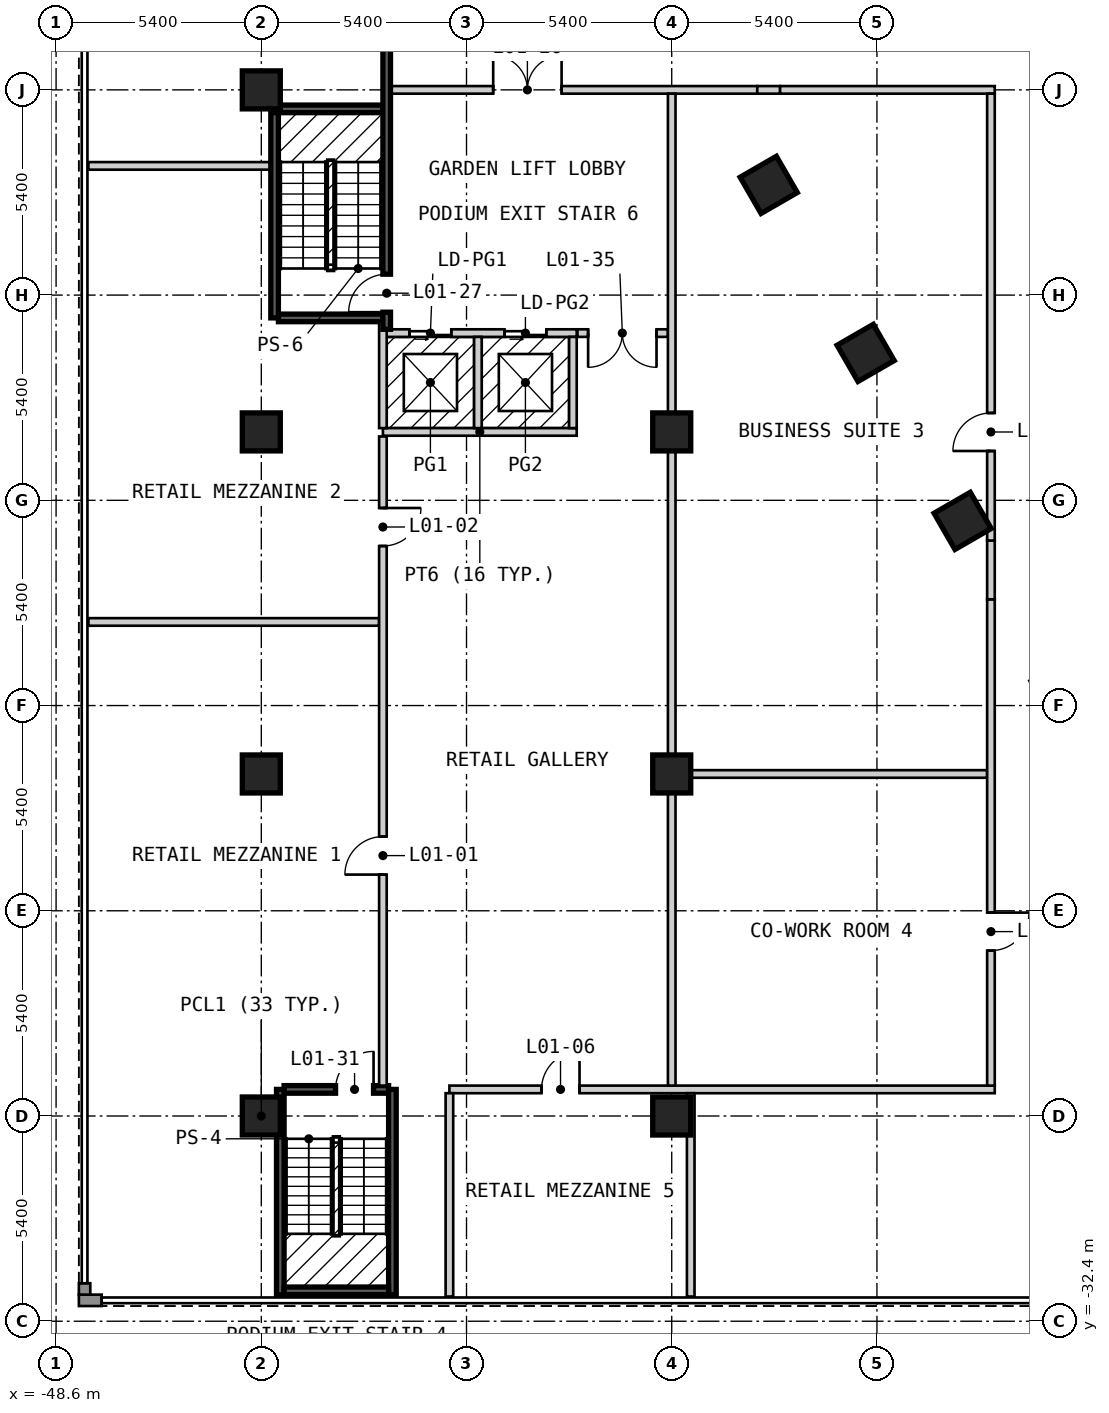
"""IFC4 building model, lengths in metres.
Left out: names, types, materials, properties, quantities, classifications, styles, units other than length and angle.
Written with IfcOpenShell. Run it as: python <this file> out.ifc"""

import sys

from ifc_helpers import new_model, si_unit, direction, frame, frame_2d, origin, origin_2d, place, context, subcontext, project, spatial, rectangle, extrude, element, fill, save


model = new_model("IFC4")
c1 = context("Model", 3, precision=1e-05, world=origin(), true_north=direction((0.0, 1.0)))
c2 = subcontext(c1, "Body", "Model", "MODEL_VIEW")
j1 = project(units=[si_unit("LENGTHUNIT", "METRE"), si_unit("PLANEANGLEUNIT", "RADIAN")], contexts=[c1])
p1 = place(None, origin())
s1 = spatial("IfcSite", under=j1, at=p1, CompositionType="ELEMENT")
p2 = place(p1, origin())
s2 = spatial("IfcBuilding", under=s1, at=p2, CompositionType="ELEMENT")
p3 = place(p2, frame((0.0, 0.0, 5.0)))
s3 = spatial("IfcBuildingStorey", under=s2, at=p3, CompositionType="ELEMENT", Elevation=5.0)
for number, where, z_axis, x_axis in (
    (1, (-29.848, -2.5, 0.0), (0.0, 0.0, 1.0), (0.5, -0.866, 0.0)),
    (2, (-27.297, -6.921, 0.0), (0.0, 0.0, 1.0), (0.5, -0.866, 0.0)),
    (3, (-24.745, -11.341, 0.0), (0.0, 0.0, 1.0), (0.5, -0.866, 0.0)),
):
    element("IfcColumn", number, at=place(p3, frame(where, z_axis=z_axis, x_axis=x_axis)), inside=s3, PredefinedType="COLUMN", context=c2, shape_type="SweptSolid", body=[
        extrude(rectangle(XDim=1.1, YDim=1.1, at=origin_2d()), origin(), (0.0, 0.0, 1.0), 4.0),
    ])
for number, where, z_axis, x_axis in (
    (4, (-43.2, -27.0, 0.0), (0.0, 0.0, 1.0), (1.0, 0.0, 0.0)),
    (5, (-43.2, -18.0, 0.0), (0.0, 0.0, 1.0), (1.0, 0.0, 0.0)),
    (6, (-43.2, -9.0, 0.0), (0.0, 0.0, 1.0), (1.0, 0.0, 0.0)),
    (7, (-43.2, 0.0, 0.0), (0.0, 0.0, 1.0), (1.0, 0.0, 0.0)),
    (8, (-32.4, -27.0, 0.0), (0.0, 0.0, 1.0), (1.0, 0.0, 0.0)),
    (9, (-32.4, -18.0, 0.0), (0.0, 0.0, 1.0), (1.0, 0.0, 0.0)),
    (10, (-32.4, -9.0, 0.0), (0.0, 0.0, 1.0), (1.0, 0.0, 0.0)),
):
    element("IfcColumn", number, at=place(p3, frame(where, z_axis=z_axis, x_axis=x_axis)), inside=s3, PredefinedType="COLUMN", context=c2, shape_type="SweptSolid", body=[
        extrude(rectangle(XDim=1.0, YDim=1.0, at=origin_2d()), origin(), (0.0, 0.0, 1.0), 4.0),
    ])
p4 = place(p3, frame((-48.0, -31.85, 0.0), z_axis=(0.0, 0.0, 1.0), x_axis=(1.0, 0.0, 0.0)))
e11 = element("IfcWall", 11, at=p4, inside=s3, PredefinedType="SOLIDWALL", context=c2, shape_type="SweptSolid", body=[
    extrude(rectangle(XDim=0.6, YDim=0.3, at=frame_2d((0.3, 0.0))), origin(), (0.0, 0.0, 1.0), 3.5),
])
p5 = place(p3, frame((-47.85, -31.4, 0.0), z_axis=(0.0, 0.0, 1.0), x_axis=(0.0, -1.0, 0.0)))
e12 = element("IfcWall", 12, at=p5, inside=s3, PredefinedType="SOLIDWALL", context=c2, shape_type="SweptSolid", body=[
    extrude(rectangle(XDim=0.3, YDim=0.3, at=frame_2d((0.15, 0.0))), origin(), (0.0, 0.0, 1.0), 3.5),
])
p6 = place(p3, frame((-42.6, -26.3, 0.0), z_axis=(0.0, 0.0, 1.0), x_axis=(1.0, 0.0, 0.0)))
e13 = element("IfcWall", 13, at=p6, inside=s3, PredefinedType="SOLIDWALL", context=c2, shape_type="SweptSolid", body=[
    extrude(rectangle(XDim=2.75, YDim=0.2, at=frame_2d((1.375, 0.0))), origin(), (0.0, 0.0, 1.0), 3.5),
])
p7 = place(p6, frame((2.354, 0.0, 0.0), z_axis=(0.0, 0.0, 1.0), x_axis=(-1.0, 0.0, 0.0)))
e14 = element("IfcOpeningElement", 14, at=p7, cuts=e13, PredefinedType="OPENING", context=c2, shape_type="SweptSolid", body=[
    extrude(rectangle(XDim=1.0, YDim=2.1, at=frame_2d((0.5, 1.05))), frame((0.0, 0.11, 0.0), z_axis=(0.0, -1.0, 0.0), x_axis=(1.0, 0.0, 0.0)), (0.0, 0.0, 1.0), 0.22),
])
p8 = place(p3, frame((-38.25, -26.3, 0.0), z_axis=(0.0, 0.0, 1.0), x_axis=(1.0, 0.0, 0.0)))
e15 = element("IfcWall", 15, at=p8, inside=s3, PredefinedType="PARTITIONING", context=c2, shape_type="SweptSolid", body=[
    extrude(rectangle(XDim=14.35, YDim=0.2, at=frame_2d((7.175, 0.0))), origin(), (0.0, 0.0, 1.0), 3.5),
])
p9 = place(p8, frame((3.424, 0.0, 0.0), z_axis=(0.0, 0.0, 1.0), x_axis=(-1.0, 0.0, 0.0)))
e16 = element("IfcOpeningElement", 16, at=p9, cuts=e15, PredefinedType="OPENING", context=c2, shape_type="SweptSolid", body=[
    extrude(rectangle(XDim=1.0, YDim=2.1, at=frame_2d((0.5, 1.05))), frame((0.0, 0.11, 0.0), z_axis=(0.0, -1.0, 0.0), x_axis=(1.0, 0.0, 0.0)), (0.0, 0.0, 1.0), 0.22),
])
p10 = place(p3, frame((-32.3, -18.0, 0.0), z_axis=(0.0, 0.0, 1.0), x_axis=(1.0, 0.0, 0.0)))
e17 = element("IfcWall", 17, at=p10, inside=s3, PredefinedType="PARTITIONING", context=c2, shape_type="SweptSolid", body=[
    extrude(rectangle(XDim=8.2, YDim=0.2, at=frame_2d((4.1, 0.0))), origin(), (0.0, 0.0, 1.0), 3.5),
])
p11 = place(p3, frame((-47.75, -14.0, 0.0), z_axis=(0.0, 0.0, 1.0), x_axis=(1.0, 0.0, 0.0)))
e18 = element("IfcWall", 18, at=p11, inside=s3, PredefinedType="PARTITIONING", context=c2, shape_type="SweptSolid", body=[
    extrude(rectangle(XDim=7.65, YDim=0.2, at=frame_2d((3.825, 0.0))), origin(), (0.0, 0.0, 1.0), 3.5),
])
p12 = place(p3, frame((-40.0, -9.0, 0.0), z_axis=(0.0, 0.0, 1.0), x_axis=(1.0, 0.0, 0.0)))
e19 = element("IfcWall", 19, at=p12, inside=s3, PredefinedType="SOLIDWALL", context=c2, shape_type="SweptSolid", body=[
    extrude(rectangle(XDim=5.1, YDim=0.2, at=frame_2d((2.55, 0.0))), origin(), (0.0, 0.0, 1.0), 3.5),
])
p13 = place(p3, frame((-40.0, -6.4, 0.0), z_axis=(0.0, 0.0, 1.0), x_axis=(1.0, 0.0, 0.0)))
e20 = element("IfcWall", 20, at=p13, inside=s3, PredefinedType="SOLIDWALL", context=c2, shape_type="SweptSolid", body=[
    extrude(rectangle(XDim=5.1, YDim=0.2, at=frame_2d((2.55, 0.0))), origin(), (0.0, 0.0, 1.0), 3.5),
])
p14 = place(p13, frame((0.7, 0.0, 0.0)))
e21 = element("IfcOpeningElement", 21, at=p14, cuts=e20, PredefinedType="OPENING", context=c2, shape_type="SweptSolid", body=[
    extrude(rectangle(XDim=1.1, YDim=2.1, at=frame_2d((0.55, 1.05))), frame((0.0, 0.11, 0.0), z_axis=(0.0, -1.0, 0.0), x_axis=(1.0, 0.0, 0.0)), (0.0, 0.0, 1.0), 0.22),
])
p15 = place(p13, frame((3.2, 0.0, 0.0)))
e22 = element("IfcOpeningElement", 22, at=p15, cuts=e20, PredefinedType="OPENING", context=c2, shape_type="SweptSolid", body=[
    extrude(rectangle(XDim=1.1, YDim=2.1, at=frame_2d((0.55, 1.05))), frame((0.0, 0.11, 0.0), z_axis=(0.0, -1.0, 0.0), x_axis=(1.0, 0.0, 0.0)), (0.0, 0.0, 1.0), 0.22),
])
p16 = place(p3, frame((-34.88, -6.4, 0.0), z_axis=(0.0, 0.0, 1.0), x_axis=(1.0, 0.0, 0.0)))
e23 = element("IfcWall", 23, at=p16, inside=s3, PredefinedType="PARTITIONING", context=c2, shape_type="SweptSolid", body=[
    extrude(rectangle(XDim=2.38, YDim=0.2, at=frame_2d((1.19, 0.0))), origin(), (0.0, 0.0, 1.0), 3.5),
])
p17 = place(p16, frame((2.08, 0.0, 0.0), z_axis=(0.0, 0.0, 1.0), x_axis=(-1.0, 0.0, 0.0)))
e24 = element("IfcOpeningElement", 24, at=p17, cuts=e23, PredefinedType="OPENING", context=c2, shape_type="SweptSolid", body=[
    extrude(rectangle(XDim=1.8, YDim=2.1, at=frame_2d((0.9, 1.05))), frame((0.0, 0.11, 0.0), z_axis=(0.0, -1.0, 0.0), x_axis=(1.0, 0.0, 0.0)), (0.0, 0.0, 1.0), 0.22),
])
p18 = place(p3, frame((-42.75, -6.0, 0.0), z_axis=(0.0, 0.0, 1.0), x_axis=(1.0, 0.0, 0.0)))
e25 = element("IfcWall", 25, at=p18, inside=s3, PredefinedType="SOLIDWALL", context=c2, shape_type="SweptSolid", body=[
    extrude(rectangle(XDim=2.75, YDim=0.2, at=frame_2d((1.375, 0.0))), origin(), (0.0, 0.0, 1.0), 3.5),
])
p19 = place(p3, frame((-47.75, -2.0, 0.0), z_axis=(0.0, 0.0, 1.0), x_axis=(1.0, 0.0, 0.0)))
e26 = element("IfcWall", 26, at=p19, inside=s3, PredefinedType="PARTITIONING", context=c2, shape_type="SweptSolid", body=[
    extrude(rectangle(XDim=5.0, YDim=0.2, at=frame_2d((2.5, 0.0))), origin(), (0.0, 0.0, 1.0), 3.5),
])
p20 = place(p3, frame((-42.85, -0.5, 0.0), z_axis=(0.0, 0.0, 1.0), x_axis=(1.0, 0.0, 0.0)))
e27 = element("IfcWall", 27, at=p20, inside=s3, PredefinedType="SOLIDWALL", context=c2, shape_type="SweptSolid", body=[
    extrude(rectangle(XDim=2.85, YDim=0.2, at=frame_2d((1.425, 0.0))), origin(), (0.0, 0.0, 1.0), 3.5),
])
p21 = place(p3, frame((-40.0, 0.0, 0.0), z_axis=(0.0, 0.0, 1.0), x_axis=(1.0, 0.0, 0.0)))
e28 = element("IfcWall", 28, at=p21, inside=s3, PredefinedType="PARTITIONING", context=c2, shape_type="SweptSolid", body=[
    extrude(rectangle(XDim=9.851, YDim=0.2, at=frame_2d((4.926, 0.0))), origin(), (0.0, 0.0, 1.0), 3.5),
])
p22 = place(p21, frame((2.902, 0.0, 0.0)))
e29 = element("IfcOpeningElement", 29, at=p22, cuts=e28, PredefinedType="OPENING", context=c2, shape_type="SweptSolid", body=[
    extrude(rectangle(XDim=1.8, YDim=2.1, at=frame_2d((0.9, 1.05))), frame((0.0, 0.11, 0.0), z_axis=(0.0, -1.0, 0.0), x_axis=(1.0, 0.0, 0.0)), (0.0, 0.0, 1.0), 0.22),
])
p23 = place(p3, frame((-30.149, 0.0, 0.0), z_axis=(0.0, 0.0, 1.0), x_axis=(1.0, 0.0, 0.0)))
e30 = element("IfcWall", 30, at=p23, inside=s3, PredefinedType="PARTITIONING", context=c2, shape_type="SweptSolid", body=[
    extrude(rectangle(XDim=0.601, YDim=0.2, at=frame_2d((0.3, 0.0))), origin(), (0.0, 0.0, 1.0), 2.77),
])
p24 = place(p3, frame((-29.548, 0.0, 0.0), z_axis=(0.0, 0.0, 1.0), x_axis=(1.0, 0.0, 0.0)))
e31 = element("IfcWall", 31, at=p24, inside=s3, PredefinedType="PARTITIONING", context=c2, shape_type="SweptSolid", body=[
    extrude(rectangle(XDim=5.648, YDim=0.2, at=frame_2d((2.824, 0.0))), origin(), (0.0, 0.0, 1.0), 3.5),
])
for number, where, z_axis, x_axis in (
    (32, (-42.85, -6.0, 0.0), (0.0, 0.0, 1.0), (0.0, 1.0, 0.0)),
    (33, (-42.7, -31.7, 0.0), (0.0, 0.0, 1.0), (0.0, 1.0, 0.0)),
):
    element("IfcWall", number, at=place(p3, frame(where, z_axis=z_axis, x_axis=x_axis)), inside=s3, PredefinedType="SOLIDWALL", context=c2, shape_type="SweptSolid", body=[
        extrude(rectangle(XDim=5.4, YDim=0.2, at=frame_2d((2.7, 0.0))), origin(), (0.0, 0.0, 1.0), 3.5),
    ])
p25 = place(p3, frame((-40.0, -26.2, 0.0), z_axis=(0.0, 0.0, 1.0), x_axis=(0.0, 1.0, 0.0)))
e34 = element("IfcWall", 34, at=p25, inside=s3, PredefinedType="PARTITIONING", context=c2, shape_type="SweptSolid", body=[
    extrude(rectangle(XDim=17.08, YDim=0.2, at=frame_2d((8.54, 0.0))), origin(), (0.0, 0.0, 1.0), 3.5),
])
p26 = place(p25, frame((5.552, 0.0, 0.0)))
e35 = element("IfcOpeningElement", 35, at=p26, cuts=e34, PredefinedType="OPENING", context=c2, shape_type="SweptSolid", body=[
    extrude(rectangle(XDim=1.0, YDim=2.1, at=frame_2d((0.5, 1.05))), frame((0.0, 0.11, 0.0), z_axis=(0.0, -1.0, 0.0), x_axis=(1.0, 0.0, 0.0)), (0.0, 0.0, 1.0), 0.22),
])
p27 = place(p25, frame((14.198, 0.0, 0.0)))
e36 = element("IfcOpeningElement", 36, at=p27, cuts=e34, PredefinedType="OPENING", context=c2, shape_type="SweptSolid", body=[
    extrude(rectangle(XDim=1.0, YDim=2.1, at=frame_2d((0.5, 1.05))), frame((0.0, 0.11, 0.0), z_axis=(0.0, -1.0, 0.0), x_axis=(1.0, 0.0, 0.0)), (0.0, 0.0, 1.0), 0.22),
])
p28 = place(p3, frame((-40.0, -8.9, 0.0), z_axis=(0.0, 0.0, 1.0), x_axis=(0.0, 1.0, 0.0)))
e37 = element("IfcWall", 37, at=p28, inside=s3, PredefinedType="SOLIDWALL", context=c2, shape_type="SweptSolid", body=[
    extrude(rectangle(XDim=2.8, YDim=0.2, at=frame_2d((1.4, 0.0))), origin(), (0.0, 0.0, 1.0), 3.5),
])
p29 = place(p3, frame((-39.9, -6.3, 0.0), z_axis=(0.0, 0.0, 1.0), x_axis=(0.0, 1.0, 0.0)))
e38 = element("IfcWall", 38, at=p29, inside=s3, PredefinedType="SOLIDWALL", context=c2, shape_type="SweptSolid", body=[
    extrude(rectangle(XDim=33.3, YDim=0.2, at=frame_2d((16.65, 0.0))), origin(), (0.0, 0.0, 1.0), 3.5),
])
p30 = place(p29, frame((10.302, 0.0, 0.0)))
e39 = element("IfcOpeningElement", 39, at=p30, cuts=e38, PredefinedType="OPENING", context=c2, shape_type="SweptSolid", body=[
    extrude(rectangle(XDim=1.0, YDim=2.1, at=frame_2d((0.5, 1.05))), frame((0.0, 0.11, 0.0), z_axis=(0.0, -1.0, 0.0), x_axis=(1.0, 0.0, 0.0)), (0.0, 0.0, 1.0), 0.22),
])
p31 = place(p29, frame((28.298, 0.0, 0.0)))
e40 = element("IfcOpeningElement", 40, at=p31, cuts=e38, PredefinedType="OPENING", context=c2, shape_type="SweptSolid", body=[
    extrude(rectangle(XDim=1.0, YDim=2.1, at=frame_2d((0.5, 1.05))), frame((0.0, 0.11, 0.0), z_axis=(0.0, -1.0, 0.0), x_axis=(1.0, 0.0, 0.0)), (0.0, 0.0, 1.0), 0.22),
])
p32 = place(p29, frame((19.3, 0.0, 0.0)))
e41 = element("IfcOpeningElement", 41, at=p32, cuts=e38, PredefinedType="OPENING", context=c2, shape_type="SweptSolid", body=[
    extrude(rectangle(XDim=1.0, YDim=2.1, at=frame_2d((0.5, 1.05))), frame((0.0, 0.11, 0.0), z_axis=(0.0, -1.0, 0.0), x_axis=(1.0, 0.0, 0.0)), (0.0, 0.0, 1.0), 0.22),
])
p33 = place(p29, frame((0.45, 0.0, 0.0)))
e42 = element("IfcOpeningElement", 42, at=p33, cuts=e38, PredefinedType="OPENING", context=c2, shape_type="SweptSolid", body=[
    extrude(rectangle(XDim=1.0, YDim=2.1, at=frame_2d((0.5, 1.05))), frame((0.0, 0.11, 0.0), z_axis=(0.0, -1.0, 0.0), x_axis=(1.0, 0.0, 0.0)), (0.0, 0.0, 1.0), 0.22),
])
p34 = place(p3, frame((-39.75, -31.7, 0.0), z_axis=(0.0, 0.0, 1.0), x_axis=(0.0, 1.0, 0.0)))
e43 = element("IfcWall", 43, at=p34, inside=s3, PredefinedType="SOLIDWALL", context=c2, shape_type="SweptSolid", body=[
    extrude(rectangle(XDim=5.4, YDim=0.2, at=frame_2d((2.7, 0.0))), origin(), (0.0, 0.0, 1.0), 3.5),
])
p35 = place(p3, frame((-38.25, -31.75, 0.0), z_axis=(0.0, 0.0, 1.0), x_axis=(0.0, 1.0, 0.0)))
e44 = element("IfcWall", 44, at=p35, inside=s3, PredefinedType="PARTITIONING", context=c2, shape_type="SweptSolid", body=[
    extrude(rectangle(XDim=5.35, YDim=0.2, at=frame_2d((2.675, 0.0))), origin(), (0.0, 0.0, 1.0), 3.5),
])
for number, where, z_axis, x_axis in (
    (45, (-37.5, -8.9, 0.0), (0.0, 0.0, 1.0), (0.0, 1.0, 0.0)),
    (46, (-35.0, -8.9, 0.0), (0.0, 0.0, 1.0), (0.0, 1.0, 0.0)),
):
    element("IfcWall", number, at=place(p3, frame(where, z_axis=z_axis, x_axis=x_axis)), inside=s3, PredefinedType="SOLIDWALL", context=c2, shape_type="SweptSolid", body=[
        extrude(rectangle(XDim=2.4, YDim=0.2, at=frame_2d((1.2, 0.0))), origin(), (0.0, 0.0, 1.0), 3.5),
    ])
p36 = place(p3, frame((-32.4, -26.2, 0.0), z_axis=(0.0, 0.0, 1.0), x_axis=(0.0, 1.0, 0.0)))
e47 = element("IfcWall", 47, at=p36, inside=s3, PredefinedType="PARTITIONING", context=c2, shape_type="SweptSolid", body=[
    extrude(rectangle(XDim=26.1, YDim=0.2, at=frame_2d((13.05, 0.0))), origin(), (0.0, 0.0, 1.0), 3.5),
])
p37 = place(p3, frame((-31.9, -31.75, 0.0), z_axis=(0.0, 0.0, 1.0), x_axis=(0.0, 1.0, 0.0)))
e48 = element("IfcWall", 48, at=p37, inside=s3, PredefinedType="PARTITIONING", context=c2, shape_type="SweptSolid", body=[
    extrude(rectangle(XDim=5.35, YDim=0.2, at=frame_2d((2.675, 0.0))), origin(), (0.0, 0.0, 1.0), 3.5),
])
p38 = place(p3, frame((-24.0, -26.2, 0.0), z_axis=(0.0, 0.0, 1.0), x_axis=(0.0, 1.0, 0.0)))
e49 = element("IfcWall", 49, at=p38, inside=s3, PredefinedType="PARTITIONING", context=c2, shape_type="SweptSolid", body=[
    extrude(rectangle(XDim=12.796, YDim=0.2, at=frame_2d((6.398, 0.0))), origin(), (0.0, 0.0, 1.0), 3.5),
])
p39 = place(p38, frame((3.552, 0.0, 0.0)))
e50 = element("IfcOpeningElement", 50, at=p39, cuts=e49, PredefinedType="OPENING", context=c2, shape_type="SweptSolid", body=[
    extrude(rectangle(XDim=1.0, YDim=2.1, at=frame_2d((0.5, 1.05))), frame((0.0, 0.11, 0.0), z_axis=(0.0, -1.0, 0.0), x_axis=(1.0, 0.0, 0.0)), (0.0, 0.0, 1.0), 0.22),
])
p40 = place(p3, frame((-24.0, -13.404, 0.0), z_axis=(0.0, 0.0, 1.0), x_axis=(0.0, 1.0, 0.0)))
e51 = element("IfcWall", 51, at=p40, inside=s3, PredefinedType="PARTITIONING", context=c2, shape_type="SweptSolid", body=[
    extrude(rectangle(XDim=1.546, YDim=0.2, at=frame_2d((0.773, 0.0))), origin(), (0.0, 0.0, 1.0), 2.77),
])
p41 = place(p3, frame((-24.0, -11.858, 0.0), z_axis=(0.0, 0.0, 1.0), x_axis=(0.0, 1.0, 0.0)))
e52 = element("IfcWall", 52, at=p41, inside=s3, PredefinedType="PARTITIONING", context=c2, shape_type="SweptSolid", body=[
    extrude(rectangle(XDim=11.758, YDim=0.2, at=frame_2d((5.879, 0.0))), origin(), (0.0, 0.0, 1.0), 3.5),
])
p42 = place(p41, frame((2.356, 0.0, 0.0)))
e53 = element("IfcOpeningElement", 53, at=p42, cuts=e52, PredefinedType="OPENING", context=c2, shape_type="SweptSolid", body=[
    extrude(rectangle(XDim=1.0, YDim=2.1, at=frame_2d((0.5, 1.05))), frame((0.0, 0.11, 0.0), z_axis=(0.0, -1.0, 0.0), x_axis=(1.0, 0.0, 0.0)), (0.0, 0.0, 1.0), 0.22),
])
p43 = place(p3, frame((-42.6, -31.6, 0.0), z_axis=(0.0, 0.0, 1.0), x_axis=(1.0, 0.0, 0.0)))
e54 = element("IfcWall", 54, at=p43, inside=s3, PredefinedType="SOLIDWALL", context=c2, shape_type="SweptSolid", body=[
    extrude(rectangle(XDim=2.75, YDim=0.2, at=frame_2d((1.375, 0.0))), origin(), (0.0, 0.0, 1.0), 3.5),
])
p44 = place(p26, origin())
e55 = element("IfcDoor", 55, at=p44, inside=s3, OperationType="SINGLE_SWING_LEFT", PredefinedType="DOOR", context=c2, shape_type="SweptSolid", body=[
    extrude(rectangle(XDim=1.0, YDim=2.1, at=frame_2d((0.5, 1.05))), frame((0.0, 0.025, 0.0), z_axis=(0.0, -1.0, 0.0), x_axis=(1.0, 0.0, 0.0)), (0.0, 0.0, 1.0), 0.05),
])
fill(e35, e55)
p45 = place(p27, origin())
e56 = element("IfcDoor", 56, at=p45, inside=s3, OperationType="SINGLE_SWING_RIGHT", PredefinedType="DOOR", context=c2, shape_type="SweptSolid", body=[
    extrude(rectangle(XDim=1.0, YDim=2.1, at=frame_2d((0.5, 1.05))), frame((0.0, 0.025, 0.0), z_axis=(0.0, -1.0, 0.0), x_axis=(1.0, 0.0, 0.0)), (0.0, 0.0, 1.0), 0.05),
])
fill(e36, e56)
p46 = place(p9, origin())
e57 = element("IfcDoor", 57, at=p46, inside=s3, OperationType="SINGLE_SWING_LEFT", PredefinedType="DOOR", context=c2, shape_type="SweptSolid", body=[
    extrude(rectangle(XDim=1.0, YDim=2.1, at=frame_2d((0.5, 1.05))), frame((0.0, 0.025, 0.0), z_axis=(0.0, -1.0, 0.0), x_axis=(1.0, 0.0, 0.0)), (0.0, 0.0, 1.0), 0.05),
])
fill(e16, e57)
p47 = place(p42, origin())
e58 = element("IfcDoor", 58, at=p47, inside=s3, OperationType="SINGLE_SWING_LEFT", PredefinedType="DOOR", context=c2, shape_type="SweptSolid", body=[
    extrude(rectangle(XDim=1.0, YDim=2.1, at=frame_2d((0.5, 1.05))), frame((0.0, 0.025, 0.0), z_axis=(0.0, -1.0, 0.0), x_axis=(1.0, 0.0, 0.0)), (0.0, 0.0, 1.0), 0.05),
])
fill(e53, e58)
p48 = place(p39, origin())
e59 = element("IfcDoor", 59, at=p48, inside=s3, OperationType="SINGLE_SWING_RIGHT", PredefinedType="DOOR", context=c2, shape_type="SweptSolid", body=[
    extrude(rectangle(XDim=1.0, YDim=2.1, at=frame_2d((0.5, 1.05))), frame((0.0, 0.025, 0.0), z_axis=(0.0, -1.0, 0.0), x_axis=(1.0, 0.0, 0.0)), (0.0, 0.0, 1.0), 0.05),
])
fill(e50, e59)
p49 = place(p22, origin())
e60 = element("IfcDoor", 60, at=p49, inside=s3, OperationType="DOUBLE_DOOR_SINGLE_SWING", PredefinedType="DOOR", context=c2, shape_type="SweptSolid", body=[
    extrude(rectangle(XDim=1.8, YDim=2.1, at=frame_2d((0.9, 1.05))), frame((0.0, 0.025, 0.0), z_axis=(0.0, -1.0, 0.0), x_axis=(1.0, 0.0, 0.0)), (0.0, 0.0, 1.0), 0.05),
])
fill(e29, e60)
p50 = place(p33, origin())
e61 = element("IfcDoor", 61, at=p50, inside=s3, OperationType="SINGLE_SWING_LEFT", PredefinedType="DOOR", context=c2, shape_type="SweptSolid", body=[
    extrude(rectangle(XDim=1.0, YDim=2.1, at=frame_2d((0.5, 1.05))), frame((0.0, 0.025, 0.0), z_axis=(0.0, -1.0, 0.0), x_axis=(1.0, 0.0, 0.0)), (0.0, 0.0, 1.0), 0.05),
])
fill(e42, e61)
p51 = place(p7, origin())
e62 = element("IfcDoor", 62, at=p51, inside=s3, OperationType="SINGLE_SWING_LEFT", PredefinedType="DOOR", context=c2, shape_type="SweptSolid", body=[
    extrude(rectangle(XDim=1.0, YDim=2.1, at=frame_2d((0.5, 1.05))), frame((0.0, 0.025, 0.0), z_axis=(0.0, -1.0, 0.0), x_axis=(1.0, 0.0, 0.0)), (0.0, 0.0, 1.0), 0.05),
])
fill(e14, e62)
p52 = place(p14, origin())
e63 = element("IfcDoor", 63, at=p52, inside=s3, OperationType="DOUBLE_DOOR_SLIDING", PredefinedType="DOOR", context=c2, shape_type="SweptSolid", body=[
    extrude(rectangle(XDim=1.1, YDim=2.1, at=frame_2d((0.55, 1.05))), frame((0.0, 0.025, 0.0), z_axis=(0.0, -1.0, 0.0), x_axis=(1.0, 0.0, 0.0)), (0.0, 0.0, 1.0), 0.05),
])
fill(e21, e63)
p53 = place(p15, origin())
e64 = element("IfcDoor", 64, at=p53, inside=s3, OperationType="DOUBLE_DOOR_SLIDING", PredefinedType="DOOR", context=c2, shape_type="SweptSolid", body=[
    extrude(rectangle(XDim=1.1, YDim=2.1, at=frame_2d((0.55, 1.05))), frame((0.0, 0.025, 0.0), z_axis=(0.0, -1.0, 0.0), x_axis=(1.0, 0.0, 0.0)), (0.0, 0.0, 1.0), 0.05),
])
fill(e22, e64)
p54 = place(p17, origin())
e65 = element("IfcDoor", 65, at=p54, inside=s3, OperationType="DOUBLE_DOOR_SINGLE_SWING", PredefinedType="DOOR", context=c2, shape_type="SweptSolid", body=[
    extrude(rectangle(XDim=1.8, YDim=2.1, at=frame_2d((0.9, 1.05))), frame((0.0, 0.025, 0.0), z_axis=(0.0, -1.0, 0.0), x_axis=(1.0, 0.0, 0.0)), (0.0, 0.0, 1.0), 0.05),
])
fill(e24, e65)
save(model, sys.argv[1])
